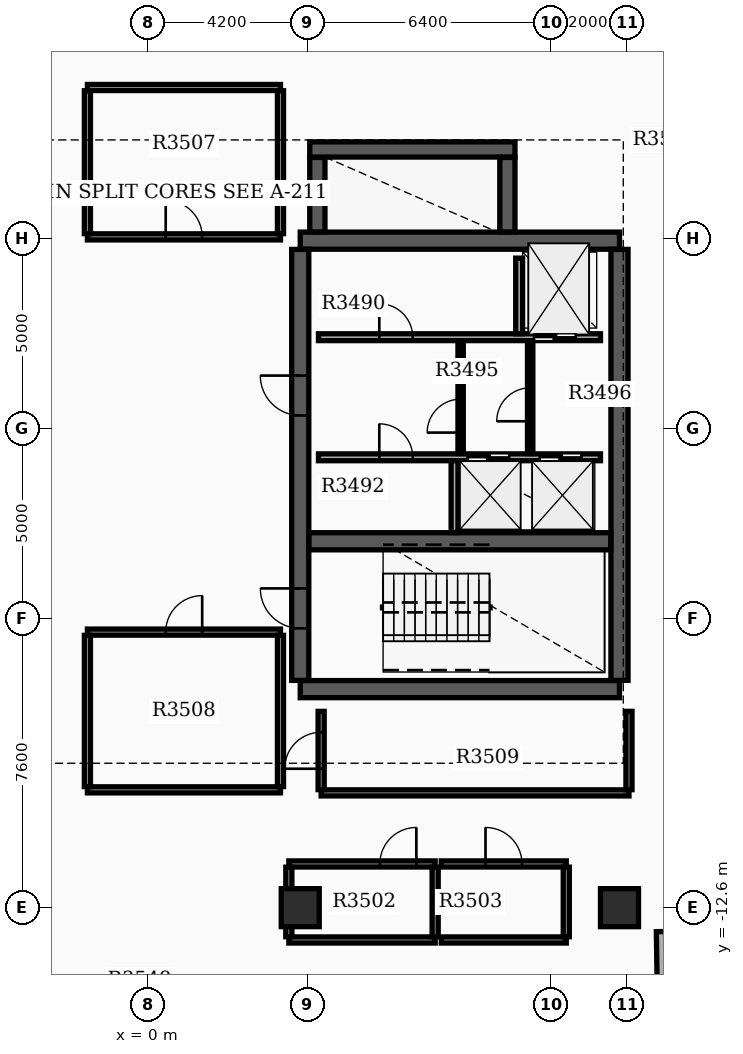
"""IFC4 building model, lengths in metres.
Left out: names, types, materials, properties, quantities, classifications, styles, units other than length and angle.
Written with IfcOpenShell. Run it as: python <this file> out.ifc"""

import sys

from ifc_helpers import new_model, si_unit, direction, frame, frame_2d, origin, origin_2d, place, context, subcontext, project, spatial, rectangle, extrude, element, fill, save


model = new_model("IFC4")
c1 = context("Model", 3, precision=1e-05, world=origin(), true_north=direction((0.0, 1.0)))
c2 = subcontext(c1, "Body", "Model", "MODEL_VIEW")
j1 = project(units=[si_unit("LENGTHUNIT", "METRE"), si_unit("PLANEANGLEUNIT", "RADIAN")], contexts=[c1])
p1 = place(None, origin())
s1 = spatial("IfcSite", under=j1, at=p1, CompositionType="ELEMENT")
p2 = place(p1, origin())
s2 = spatial("IfcBuilding", under=s1, at=p2, CompositionType="ELEMENT")
p3 = place(p2, frame((0.0, 0.0, 220.8)))
s3 = spatial("IfcBuildingStorey", under=s2, at=p3, CompositionType="ELEMENT", Elevation=220.8)
for number, where, z_axis, x_axis in (
    (1, (4.0, -6.85, 0.0), (0.0, 0.0, 1.0), (1.0, 0.0, 0.0)),
    (2, (4.0, 4.95, 0.0), (0.0, 0.0, 1.0), (1.0, 0.0, 0.0)),
):
    element("IfcWall", number, at=place(p3, frame(where, z_axis=z_axis, x_axis=x_axis)), inside=s3, PredefinedType="SHEAR", context=c2, shape_type="SweptSolid", body=[
        extrude(rectangle(XDim=8.4, YDim=0.45, at=frame_2d((4.2, 0.0))), origin(), (0.0, 0.0, 1.0), 3.7),
    ])
p4 = place(p3, frame((4.0, -6.62, 0.0), z_axis=(0.0, 0.0, 1.0), x_axis=(0.0, 1.0, 0.0)))
e3 = element("IfcWall", 3, at=p4, inside=s3, PredefinedType="SHEAR", context=c2, shape_type="SweptSolid", body=[
    extrude(rectangle(XDim=11.34, YDim=0.45, at=frame_2d((5.67, 0.0))), origin(), (0.0, 0.0, 1.0), 3.7),
])
p5 = place(p4, frame((1.37, 0.0, 0.0)))
e4 = element("IfcOpeningElement", 4, at=p5, cuts=e3, PredefinedType="OPENING", context=c2, shape_type="SweptSolid", body=[
    extrude(rectangle(XDim=1.05, YDim=2.15, at=frame_2d((0.525, 1.075))), frame((0.0, 0.235, 0.0), z_axis=(0.0, -1.0, 0.0), x_axis=(1.0, 0.0, 0.0)), (0.0, 0.0, 1.0), 0.47),
])
p6 = place(p4, frame((6.97, 0.0, 0.0)))
e5 = element("IfcOpeningElement", 5, at=p6, cuts=e3, PredefinedType="OPENING", context=c2, shape_type="SweptSolid", body=[
    extrude(rectangle(XDim=1.05, YDim=2.15, at=frame_2d((0.525, 1.075))), frame((0.0, 0.235, 0.0), z_axis=(0.0, -1.0, 0.0), x_axis=(1.0, 0.0, 0.0)), (0.0, 0.0, 1.0), 0.47),
])
p7 = place(p3, frame((12.4, -6.62, 0.0), z_axis=(0.0, 0.0, 1.0), x_axis=(0.0, 1.0, 0.0)))
e6 = element("IfcWall", 6, at=p7, inside=s3, PredefinedType="SHEAR", context=c2, shape_type="SweptSolid", body=[
    extrude(rectangle(XDim=11.34, YDim=0.45, at=frame_2d((5.67, 0.0))), origin(), (0.0, 0.0, 1.0), 3.7),
])
p8 = place(p3, frame((4.23, -2.96, 0.0), z_axis=(0.0, 0.0, 1.0), x_axis=(1.0, 0.0, 0.0)))
e7 = element("IfcWall", 7, at=p8, inside=s3, PredefinedType="SHEAR", context=c2, shape_type="SweptSolid", body=[
    extrude(rectangle(XDim=7.94, YDim=0.45, at=frame_2d((3.97, 0.0))), origin(), (0.0, 0.0, 1.0), 3.7),
])
p9 = place(p3, frame((4.45, 5.18, 0.0), z_axis=(0.0, 0.0, 1.0), x_axis=(0.0, 1.0, 0.0)))
e8 = element("IfcWall", 8, at=p9, inside=s3, PredefinedType="SHEAR", context=c2, shape_type="SweptSolid", body=[
    extrude(rectangle(XDim=1.96, YDim=0.4, at=frame_2d((0.98, 0.0))), origin(), (0.0, 0.0, 1.0), 3.7),
])
p10 = place(p3, frame((4.25, 7.35, 0.0), z_axis=(0.0, 0.0, 1.0), x_axis=(1.0, 0.0, 0.0)))
e9 = element("IfcWall", 9, at=p10, inside=s3, PredefinedType="SHEAR", context=c2, shape_type="SweptSolid", body=[
    extrude(rectangle(XDim=5.4, YDim=0.4, at=frame_2d((2.7, 0.0))), origin(), (0.0, 0.0, 1.0), 3.7),
])
p11 = place(p3, frame((9.45, 5.18, 0.0), z_axis=(0.0, 0.0, 1.0), x_axis=(0.0, 1.0, 0.0)))
e10 = element("IfcWall", 10, at=p11, inside=s3, PredefinedType="SHEAR", context=c2, shape_type="SweptSolid", body=[
    extrude(rectangle(XDim=1.96, YDim=0.4, at=frame_2d((0.98, 0.0))), origin(), (0.0, 0.0, 1.0), 3.7),
])
for number, where, z_axis, x_axis in (
    (11, (12.4, -12.6, 0.0), (0.0, 0.0, 1.0), (1.0, 0.0, 0.0)),
    (12, (4.0, -12.6, 0.0), (0.0, 0.0, 1.0), (1.0, 0.0, 0.0)),
):
    element("IfcColumn", number, at=place(p3, frame(where, z_axis=z_axis, x_axis=x_axis)), inside=s3, PredefinedType="COLUMN", context=c2, shape_type="SweptSolid", body=[
        extrude(rectangle(XDim=1.0, YDim=1.0, at=origin_2d()), origin(), (0.0, 0.0, 1.0), 3.9),
    ])
p12 = place(p3, frame((13.51, -13.229, 0.0), z_axis=(0.0, 0.0, 1.0), x_axis=(0.015625635615, -0.999877912303, 0.0)))
e13 = element("IfcWall", 13, at=p12, inside=s3, PredefinedType="STANDARD", context=c2, shape_type="SweptSolid", body=[
    extrude(rectangle(XDim=1.5, YDim=0.28, at=frame_2d((0.75, 0.0))), origin(), (0.0, 0.0, 1.0), 3.18),
])
p13 = place(p3, frame((4.48, 2.41, 0.0), z_axis=(0.0, 0.0, 1.0), x_axis=(1.0, 0.0, 0.0)))
e14 = element("IfcWall", 14, at=p13, inside=s3, PredefinedType="SOLIDWALL", context=c2, shape_type="SweptSolid", body=[
    extrude(rectangle(XDim=7.42, YDim=0.18, at=frame_2d((3.71, 0.0))), origin(), (0.0, 0.0, 1.0), 3.17),
])
p14 = place(p13, frame((5.67, 0.0, 0.0)))
e15 = element("IfcOpeningElement", 15, at=p14, cuts=e14, PredefinedType="OPENING", context=c2, shape_type="SweptSolid", body=[
    extrude(rectangle(XDim=1.1, YDim=2.15, at=frame_2d((0.55, 1.075))), frame((0.0, 0.1, 0.0), z_axis=(0.0, -1.0, 0.0), x_axis=(1.0, 0.0, 0.0)), (0.0, 0.0, 1.0), 0.2),
])
p15 = place(p13, frame((1.6, 0.0, 0.0)))
e16 = element("IfcOpeningElement", 16, at=p15, cuts=e14, PredefinedType="OPENING", context=c2, shape_type="SweptSolid", body=[
    extrude(rectangle(XDim=0.88, YDim=2.1, at=frame_2d((0.44, 1.05))), frame((0.0, 0.1, 0.0), z_axis=(0.0, -1.0, 0.0), x_axis=(1.0, 0.0, 0.0)), (0.0, 0.0, 1.0), 0.2),
])
p16 = place(p3, frame((4.48, -0.75, 0.0), z_axis=(0.0, 0.0, 1.0), x_axis=(1.0, 0.0, 0.0)))
e17 = element("IfcWall", 17, at=p16, inside=s3, PredefinedType="SOLIDWALL", context=c2, shape_type="SweptSolid", body=[
    extrude(rectangle(XDim=7.42, YDim=0.18, at=frame_2d((3.71, 0.0))), origin(), (0.0, 0.0, 1.0), 3.17),
])
p17 = place(p16, frame((3.92, 0.0, 0.0)))
e18 = element("IfcOpeningElement", 18, at=p17, cuts=e17, PredefinedType="OPENING", context=c2, shape_type="SweptSolid", body=[
    extrude(rectangle(XDim=1.1, YDim=2.15, at=frame_2d((0.55, 1.075))), frame((0.0, 0.1, 0.0), z_axis=(0.0, -1.0, 0.0), x_axis=(1.0, 0.0, 0.0)), (0.0, 0.0, 1.0), 0.2),
])
p18 = place(p16, frame((5.82, 0.0, 0.0)))
e19 = element("IfcOpeningElement", 19, at=p18, cuts=e17, PredefinedType="OPENING", context=c2, shape_type="SweptSolid", body=[
    extrude(rectangle(XDim=1.1, YDim=2.15, at=frame_2d((0.55, 1.075))), frame((0.0, 0.1, 0.0), z_axis=(0.0, -1.0, 0.0), x_axis=(1.0, 0.0, 0.0)), (0.0, 0.0, 1.0), 0.2),
])
p19 = place(p16, frame((1.6, 0.0, 0.0)))
e20 = element("IfcOpeningElement", 20, at=p19, cuts=e17, PredefinedType="OPENING", context=c2, shape_type="SweptSolid", body=[
    extrude(rectangle(XDim=0.88, YDim=2.1, at=frame_2d((0.44, 1.05))), frame((0.0, 0.1, 0.0), z_axis=(0.0, -1.0, 0.0), x_axis=(1.0, 0.0, 0.0)), (0.0, 0.0, 1.0), 0.2),
])
p20 = place(p3, frame((9.76, 2.5, 0.0), z_axis=(0.0, 0.0, 1.0), x_axis=(0.0, 1.0, 0.0)))
e21 = element("IfcWall", 21, at=p20, inside=s3, PredefinedType="SOLIDWALL", context=c2, shape_type="SweptSolid", body=[
    extrude(rectangle(XDim=1.99, YDim=0.18, at=frame_2d((0.995, 0.0))), origin(), (0.0, 0.0, 1.0), 3.17),
])
p21 = place(p3, frame((8.06, -2.73, 0.0), z_axis=(0.0, 0.0, 1.0), x_axis=(0.0, 1.0, 0.0)))
e22 = element("IfcWall", 22, at=p21, inside=s3, PredefinedType="SOLIDWALL", context=c2, shape_type="SweptSolid", body=[
    extrude(rectangle(XDim=1.89, YDim=0.18, at=frame_2d((0.945, 0.0))), origin(), (0.0, 0.0, 1.0), 3.17),
])
p22 = place(p3, frame((8.22, -0.65, 0.0), z_axis=(0.0, 0.0, 1.0), x_axis=(0.0, 1.0, 0.0)))
e23 = element("IfcWall", 23, at=p22, inside=s3, PredefinedType="SOLIDWALL", context=c2, shape_type="SweptSolid", body=[
    extrude(rectangle(XDim=2.96, YDim=0.14, at=frame_2d((1.48, 0.0))), origin(), (0.0, 0.0, 1.0), 3.17),
])
p23 = place(p22, frame((0.55, 0.0, 0.0)))
e24 = element("IfcOpeningElement", 24, at=p23, cuts=e23, PredefinedType="OPENING", context=c2, shape_type="SweptSolid", body=[
    extrude(rectangle(XDim=0.88, YDim=2.1, at=frame_2d((0.44, 1.05))), frame((0.0, 0.08, 0.0), z_axis=(0.0, -1.0, 0.0), x_axis=(1.0, 0.0, 0.0)), (0.0, 0.0, 1.0), 0.16),
])
p24 = place(p3, frame((10.05, -0.652, 0.0), z_axis=(0.0, 0.0, 1.0), x_axis=(0.0, 1.0, 0.0)))
e25 = element("IfcWall", 25, at=p24, inside=s3, PredefinedType="PARTITIONING", context=c2, shape_type="SweptSolid", body=[
    extrude(rectangle(XDim=2.962, YDim=0.14, at=frame_2d((1.481, 0.0))), origin(), (0.0, 0.0, 1.0), 3.17),
])
p25 = place(p24, frame((0.85, 0.0, 0.0)))
e26 = element("IfcOpeningElement", 26, at=p25, cuts=e25, PredefinedType="OPENING", context=c2, shape_type="SweptSolid", body=[
    extrude(rectangle(XDim=0.88, YDim=2.1, at=frame_2d((0.44, 1.05))), frame((0.0, 0.08, 0.0), z_axis=(0.0, -1.0, 0.0), x_axis=(1.0, 0.0, 0.0)), (0.0, 0.0, 1.0), 0.16),
])
p26 = place(p3, frame((3.7, -13.45, 0.0), z_axis=(0.0, 0.0, 1.0), x_axis=(1.0, 0.0, 0.0)))
e27 = element("IfcWall", 27, at=p26, inside=s3, PredefinedType="PARTITIONING", context=c2, shape_type="SweptSolid", body=[
    extrude(rectangle(XDim=3.85, YDim=0.16, at=frame_2d((1.925, 0.0))), origin(), (0.0, 0.0, 1.0), 3.17),
])
p27 = place(p3, frame((3.7, -11.45, 0.0), z_axis=(0.0, 0.0, 1.0), x_axis=(1.0, 0.0, 0.0)))
e28 = element("IfcWall", 28, at=p27, inside=s3, PredefinedType="PARTITIONING", context=c2, shape_type="SweptSolid", body=[
    extrude(rectangle(XDim=3.85, YDim=0.16, at=frame_2d((1.925, 0.0))), origin(), (0.0, 0.0, 1.0), 3.17),
])
p28 = place(p27, frame((2.395, 0.0, 0.0)))
e29 = element("IfcOpeningElement", 29, at=p28, cuts=e28, PredefinedType="OPENING", context=c2, shape_type="SweptSolid", body=[
    extrude(rectangle(XDim=0.96, YDim=2.15, at=frame_2d((0.48, 1.075))), frame((0.0, 0.09, 0.0), z_axis=(0.0, -1.0, 0.0), x_axis=(1.0, 0.0, 0.0)), (0.0, 0.0, 1.0), 0.18),
])
for number, where, z_axis, x_axis in (
    (30, (3.7, -13.365, 0.0), (0.0, 0.0, 1.0), (0.0, 1.0, 0.0)),
    (31, (7.55, -13.365, 0.0), (0.0, 0.0, 1.0), (0.0, 1.0, 0.0)),
):
    element("IfcWall", number, at=place(p3, frame(where, z_axis=z_axis, x_axis=x_axis)), inside=s3, PredefinedType="PARTITIONING", context=c2, shape_type="SweptSolid", body=[
        extrude(rectangle(XDim=1.83, YDim=0.16, at=frame_2d((0.915, 0.0))), origin(), (0.0, 0.0, 1.0), 3.17),
    ])
p29 = place(p3, frame((7.71, -13.45, 0.0), z_axis=(0.0, 0.0, 1.0), x_axis=(1.0, 0.0, 0.0)))
e32 = element("IfcWall", 32, at=p29, inside=s3, PredefinedType="PARTITIONING", context=c2, shape_type="SweptSolid", body=[
    extrude(rectangle(XDim=3.29, YDim=0.16, at=frame_2d((1.645, 0.0))), origin(), (0.0, 0.0, 1.0), 3.17),
])
p30 = place(p3, frame((7.71, -11.45, 0.0), z_axis=(0.0, 0.0, 1.0), x_axis=(1.0, 0.0, 0.0)))
e33 = element("IfcWall", 33, at=p30, inside=s3, PredefinedType="PARTITIONING", context=c2, shape_type="SweptSolid", body=[
    extrude(rectangle(XDim=3.29, YDim=0.16, at=frame_2d((1.645, 0.0))), origin(), (0.0, 0.0, 1.0), 3.17),
])
p31 = place(p30, frame((1.165, 0.0, 0.0)))
e34 = element("IfcOpeningElement", 34, at=p31, cuts=e33, PredefinedType="OPENING", context=c2, shape_type="SweptSolid", body=[
    extrude(rectangle(XDim=0.96, YDim=2.15, at=frame_2d((0.48, 1.075))), frame((0.0, 0.09, 0.0), z_axis=(0.0, -1.0, 0.0), x_axis=(1.0, 0.0, 0.0)), (0.0, 0.0, 1.0), 0.18),
])
p32 = place(p3, frame((11.0, -13.365, 0.0), z_axis=(0.0, 0.0, 1.0), x_axis=(0.0, 1.0, 0.0)))
e35 = element("IfcWall", 35, at=p32, inside=s3, PredefinedType="PARTITIONING", context=c2, shape_type="SweptSolid", body=[
    extrude(rectangle(XDim=1.83, YDim=0.16, at=frame_2d((0.915, 0.0))), origin(), (0.0, 0.0, 1.0), 3.17),
])
p33 = place(p3, frame((-1.6, 5.05, 0.0), z_axis=(0.0, 0.0, 1.0), x_axis=(1.0, 0.0, 0.0)))
e36 = element("IfcWall", 36, at=p33, inside=s3, PredefinedType="PARTITIONING", context=c2, shape_type="SweptSolid", body=[
    extrude(rectangle(XDim=5.08, YDim=0.16, at=frame_2d((2.54, 0.0))), origin(), (0.0, 0.0, 1.0), 3.17),
])
p34 = place(p33, frame((2.06, 0.0, 0.0)))
e37 = element("IfcOpeningElement", 37, at=p34, cuts=e36, PredefinedType="OPENING", context=c2, shape_type="SweptSolid", body=[
    extrude(rectangle(XDim=0.96, YDim=2.15, at=frame_2d((0.48, 1.075))), frame((0.0, 0.09, 0.0), z_axis=(0.0, -1.0, 0.0), x_axis=(1.0, 0.0, 0.0)), (0.0, 0.0, 1.0), 0.18),
])
p35 = place(p3, frame((-1.6, 8.98, 0.0), z_axis=(0.0, 0.0, 1.0), x_axis=(1.0, 0.0, 0.0)))
e38 = element("IfcWall", 38, at=p35, inside=s3, PredefinedType="PARTITIONING", context=c2, shape_type="SweptSolid", body=[
    extrude(rectangle(XDim=5.08, YDim=0.16, at=frame_2d((2.54, 0.0))), origin(), (0.0, 0.0, 1.0), 3.17),
])
for number, where, z_axis, x_axis in (
    (39, (-1.6, 5.135, 0.0), (0.0, 0.0, 1.0), (0.0, 1.0, 0.0)),
    (40, (3.48, 5.135, 0.0), (0.0, 0.0, 1.0), (0.0, 1.0, 0.0)),
):
    element("IfcWall", number, at=place(p3, frame(where, z_axis=z_axis, x_axis=x_axis)), inside=s3, PredefinedType="PARTITIONING", context=c2, shape_type="SweptSolid", body=[
        extrude(rectangle(XDim=3.76, YDim=0.16, at=frame_2d((1.88, 0.0))), origin(), (0.0, 0.0, 1.0), 3.17),
    ])
p36 = place(p3, frame((-1.6, -9.5, 0.0), z_axis=(0.0, 0.0, 1.0), x_axis=(1.0, 0.0, 0.0)))
e41 = element("IfcWall", 41, at=p36, inside=s3, PredefinedType="PARTITIONING", context=c2, shape_type="SweptSolid", body=[
    extrude(rectangle(XDim=5.08, YDim=0.16, at=frame_2d((2.54, 0.0))), origin(), (0.0, 0.0, 1.0), 3.17),
])
p37 = place(p3, frame((-1.6, -5.35, 0.0), z_axis=(0.0, 0.0, 1.0), x_axis=(1.0, 0.0, 0.0)))
e42 = element("IfcWall", 42, at=p37, inside=s3, PredefinedType="PARTITIONING", context=c2, shape_type="SweptSolid", body=[
    extrude(rectangle(XDim=5.08, YDim=0.16, at=frame_2d((2.54, 0.0))), origin(), (0.0, 0.0, 1.0), 3.17),
])
p38 = place(p37, frame((2.06, 0.0, 0.0)))
e43 = element("IfcOpeningElement", 43, at=p38, cuts=e42, PredefinedType="OPENING", context=c2, shape_type="SweptSolid", body=[
    extrude(rectangle(XDim=0.96, YDim=2.15, at=frame_2d((0.48, 1.075))), frame((0.0, 0.09, 0.0), z_axis=(0.0, -1.0, 0.0), x_axis=(1.0, 0.0, 0.0)), (0.0, 0.0, 1.0), 0.18),
])
for number, where, z_axis, x_axis in (
    (44, (-1.6, -9.415, 0.0), (0.0, 0.0, 1.0), (0.0, 1.0, 0.0)),
    (45, (3.48, -9.415, 0.0), (0.0, 0.0, 1.0), (0.0, 1.0, 0.0)),
):
    element("IfcWall", number, at=place(p3, frame(where, z_axis=z_axis, x_axis=x_axis)), inside=s3, PredefinedType="PARTITIONING", context=c2, shape_type="SweptSolid", body=[
        extrude(rectangle(XDim=3.98, YDim=0.16, at=frame_2d((1.99, 0.0))), origin(), (0.0, 0.0, 1.0), 3.17),
    ])
p39 = place(p3, frame((4.55, -9.58, 0.0), z_axis=(0.0, 0.0, 1.0), x_axis=(1.0, 0.0, 0.0)))
e46 = element("IfcWall", 46, at=p39, inside=s3, PredefinedType="PARTITIONING", context=c2, shape_type="SweptSolid", body=[
    extrude(rectangle(XDim=8.1, YDim=0.16, at=frame_2d((4.05, 0.0))), origin(), (0.0, 0.0, 1.0), 3.17),
])
p40 = place(p3, frame((4.55, -9.495, 0.0), z_axis=(0.0, 0.0, 1.0), x_axis=(0.0, 1.0, 0.0)))
e47 = element("IfcWall", 47, at=p40, inside=s3, PredefinedType="PARTITIONING", context=c2, shape_type="SweptSolid", body=[
    extrude(rectangle(XDim=2.06, YDim=0.16, at=frame_2d((1.03, 0.0))), origin(), (0.0, 0.0, 1.0), 3.17),
])
p41 = place(p40, frame((0.55, 0.0, 0.0)))
e48 = element("IfcOpeningElement", 48, at=p41, cuts=e47, PredefinedType="OPENING", context=c2, shape_type="SweptSolid", body=[
    extrude(rectangle(XDim=0.96, YDim=2.15, at=frame_2d((0.48, 1.075))), frame((0.0, 0.09, 0.0), z_axis=(0.0, -1.0, 0.0), x_axis=(1.0, 0.0, 0.0)), (0.0, 0.0, 1.0), 0.18),
])
p42 = place(p3, frame((12.65, -9.495, 0.0), z_axis=(0.0, 0.0, 1.0), x_axis=(0.0, 1.0, 0.0)))
e49 = element("IfcWall", 49, at=p42, inside=s3, PredefinedType="PARTITIONING", context=c2, shape_type="SweptSolid", body=[
    extrude(rectangle(XDim=2.06, YDim=0.16, at=frame_2d((1.03, 0.0))), origin(), (0.0, 0.0, 1.0), 3.17),
])
p43 = place(p5, origin())
e50 = element("IfcDoor", 50, at=p43, inside=s3, OperationType="SINGLE_SWING_RIGHT", PredefinedType="DOOR", context=c2, shape_type="SweptSolid", body=[
    extrude(rectangle(XDim=1.05, YDim=2.15, at=frame_2d((0.525, 1.075))), frame((0.0, 0.025, 0.0), z_axis=(0.0, -1.0, 0.0), x_axis=(1.0, 0.0, 0.0)), (0.0, 0.0, 1.0), 0.05),
])
fill(e4, e50)
p44 = place(p6, origin())
e51 = element("IfcDoor", 51, at=p44, inside=s3, OperationType="SINGLE_SWING_RIGHT", PredefinedType="DOOR", context=c2, shape_type="SweptSolid", body=[
    extrude(rectangle(XDim=1.05, YDim=2.15, at=frame_2d((0.525, 1.075))), frame((0.0, 0.025, 0.0), z_axis=(0.0, -1.0, 0.0), x_axis=(1.0, 0.0, 0.0)), (0.0, 0.0, 1.0), 0.05),
])
fill(e5, e51)
p45 = place(p14, origin())
e52 = element("IfcDoor", 52, at=p45, inside=s3, OperationType="DOUBLE_DOOR_SLIDING", PredefinedType="DOOR", context=c2, shape_type="SweptSolid", body=[
    extrude(rectangle(XDim=1.1, YDim=2.15, at=frame_2d((0.55, 1.075))), frame((0.0, 0.025, 0.0), z_axis=(0.0, -1.0, 0.0), x_axis=(1.0, 0.0, 0.0)), (0.0, 0.0, 1.0), 0.05),
])
fill(e15, e52)
p46 = place(p17, origin())
e53 = element("IfcDoor", 53, at=p46, inside=s3, OperationType="DOUBLE_DOOR_SLIDING", PredefinedType="DOOR", context=c2, shape_type="SweptSolid", body=[
    extrude(rectangle(XDim=1.1, YDim=2.15, at=frame_2d((0.55, 1.075))), frame((0.0, 0.025, 0.0), z_axis=(0.0, -1.0, 0.0), x_axis=(1.0, 0.0, 0.0)), (0.0, 0.0, 1.0), 0.05),
])
fill(e18, e53)
p47 = place(p18, origin())
e54 = element("IfcDoor", 54, at=p47, inside=s3, OperationType="DOUBLE_DOOR_SLIDING", PredefinedType="DOOR", context=c2, shape_type="SweptSolid", body=[
    extrude(rectangle(XDim=1.1, YDim=2.15, at=frame_2d((0.55, 1.075))), frame((0.0, 0.025, 0.0), z_axis=(0.0, -1.0, 0.0), x_axis=(1.0, 0.0, 0.0)), (0.0, 0.0, 1.0), 0.05),
])
fill(e19, e54)
p48 = place(p15, origin())
e55 = element("IfcDoor", 55, at=p48, inside=s3, OperationType="SINGLE_SWING_LEFT", PredefinedType="DOOR", context=c2, shape_type="SweptSolid", body=[
    extrude(rectangle(XDim=0.88, YDim=2.1, at=frame_2d((0.44, 1.05))), frame((0.0, 0.025, 0.0), z_axis=(0.0, -1.0, 0.0), x_axis=(1.0, 0.0, 0.0)), (0.0, 0.0, 1.0), 0.05),
])
fill(e16, e55)
p49 = place(p19, origin())
e56 = element("IfcDoor", 56, at=p49, inside=s3, OperationType="SINGLE_SWING_LEFT", PredefinedType="DOOR", context=c2, shape_type="SweptSolid", body=[
    extrude(rectangle(XDim=0.88, YDim=2.1, at=frame_2d((0.44, 1.05))), frame((0.0, 0.025, 0.0), z_axis=(0.0, -1.0, 0.0), x_axis=(1.0, 0.0, 0.0)), (0.0, 0.0, 1.0), 0.05),
])
fill(e20, e56)
p50 = place(p23, origin())
e57 = element("IfcDoor", 57, at=p50, inside=s3, OperationType="SINGLE_SWING_LEFT", PredefinedType="DOOR", context=c2, shape_type="SweptSolid", body=[
    extrude(rectangle(XDim=0.88, YDim=2.1, at=frame_2d((0.44, 1.05))), frame((0.0, 0.025, 0.0), z_axis=(0.0, -1.0, 0.0), x_axis=(1.0, 0.0, 0.0)), (0.0, 0.0, 1.0), 0.05),
])
fill(e24, e57)
p51 = place(p25, origin())
e58 = element("IfcDoor", 58, at=p51, inside=s3, OperationType="SINGLE_SWING_LEFT", PredefinedType="DOOR", context=c2, shape_type="SweptSolid", body=[
    extrude(rectangle(XDim=0.88, YDim=2.1, at=frame_2d((0.44, 1.05))), frame((0.0, 0.025, 0.0), z_axis=(0.0, -1.0, 0.0), x_axis=(1.0, 0.0, 0.0)), (0.0, 0.0, 1.0), 0.05),
])
fill(e26, e58)
p52 = place(p28, origin())
e59 = element("IfcDoor", 59, at=p52, inside=s3, OperationType="SINGLE_SWING_RIGHT", PredefinedType="DOOR", context=c2, shape_type="SweptSolid", body=[
    extrude(rectangle(XDim=0.96, YDim=2.15, at=frame_2d((0.48, 1.075))), frame((0.0, 0.025, 0.0), z_axis=(0.0, -1.0, 0.0), x_axis=(1.0, 0.0, 0.0)), (0.0, 0.0, 1.0), 0.05),
])
fill(e29, e59)
p53 = place(p31, origin())
e60 = element("IfcDoor", 60, at=p53, inside=s3, OperationType="SINGLE_SWING_LEFT", PredefinedType="DOOR", context=c2, shape_type="SweptSolid", body=[
    extrude(rectangle(XDim=0.96, YDim=2.15, at=frame_2d((0.48, 1.075))), frame((0.0, 0.025, 0.0), z_axis=(0.0, -1.0, 0.0), x_axis=(1.0, 0.0, 0.0)), (0.0, 0.0, 1.0), 0.05),
])
fill(e34, e60)
p54 = place(p34, origin())
e61 = element("IfcDoor", 61, at=p54, inside=s3, OperationType="SINGLE_SWING_LEFT", PredefinedType="DOOR", context=c2, shape_type="SweptSolid", body=[
    extrude(rectangle(XDim=0.96, YDim=2.15, at=frame_2d((0.48, 1.075))), frame((0.0, 0.025, 0.0), z_axis=(0.0, -1.0, 0.0), x_axis=(1.0, 0.0, 0.0)), (0.0, 0.0, 1.0), 0.05),
])
fill(e37, e61)
p55 = place(p38, origin())
e62 = element("IfcDoor", 62, at=p55, inside=s3, OperationType="SINGLE_SWING_RIGHT", PredefinedType="DOOR", context=c2, shape_type="SweptSolid", body=[
    extrude(rectangle(XDim=0.96, YDim=2.15, at=frame_2d((0.48, 1.075))), frame((0.0, 0.025, 0.0), z_axis=(0.0, -1.0, 0.0), x_axis=(1.0, 0.0, 0.0)), (0.0, 0.0, 1.0), 0.05),
])
fill(e43, e62)
p56 = place(p41, origin())
e63 = element("IfcDoor", 63, at=p56, inside=s3, OperationType="SINGLE_SWING_LEFT", PredefinedType="DOOR", context=c2, shape_type="SweptSolid", body=[
    extrude(rectangle(XDim=0.96, YDim=2.15, at=frame_2d((0.48, 1.075))), frame((0.0, 0.025, 0.0), z_axis=(0.0, -1.0, 0.0), x_axis=(1.0, 0.0, 0.0)), (0.0, 0.0, 1.0), 0.05),
])
fill(e48, e63)
save(model, sys.argv[1])
